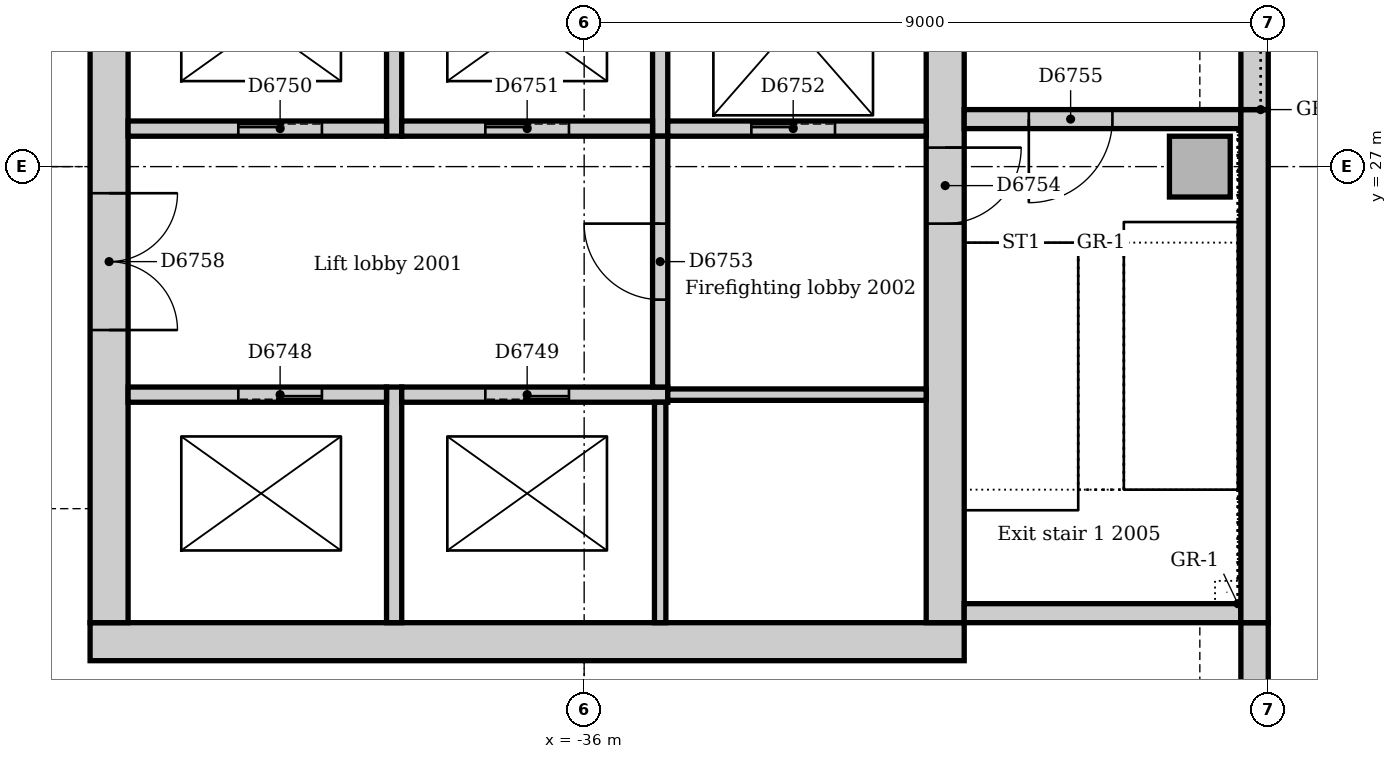
"""IFC4 building model, lengths in metres.
Left out: names, types, materials, properties, quantities, classifications, styles, units other than length and angle.
Written with IfcOpenShell. Run it as: python <this file> out.ifc"""

import sys

from ifc_helpers import new_model, si_unit, direction, frame, frame_2d, origin, origin_2d, place, context, subcontext, project, spatial, rectangle, extrude, element, fill, save


model = new_model("IFC4")
c1 = context("Model", 3, precision=1e-05, world=origin(), true_north=direction((0.0, 1.0)))
c2 = subcontext(c1, "Body", "Model", "MODEL_VIEW")
j1 = project(units=[si_unit("LENGTHUNIT", "METRE"), si_unit("PLANEANGLEUNIT", "RADIAN")], contexts=[c1])
p1 = place(None, origin())
s1 = spatial("IfcSite", under=j1, at=p1, CompositionType="ELEMENT")
p2 = place(p1, origin())
s2 = spatial("IfcBuilding", under=s1, at=p2, CompositionType="ELEMENT")
p3 = place(p2, frame((0.0, 0.0, 87.0)))
s3 = spatial("IfcBuildingStorey", under=s2, at=p3, CompositionType="ELEMENT", Elevation=87.0)
p4 = place(p3, frame((-42.5, 20.75, 0.0), z_axis=(0.0, 0.0, 1.0), x_axis=(1.0, 0.0, 0.0)))
e1 = element("IfcWall", 1, at=p4, inside=s3, PredefinedType="SOLIDWALL", context=c2, shape_type="SweptSolid", body=[
    extrude(rectangle(XDim=11.5, YDim=0.5, at=frame_2d((5.75, 0.0))), origin(), (0.0, 0.0, 1.0), 4.0),
])
p5 = place(p3, frame((-31.25, 21.0, 0.0), z_axis=(0.0, 0.0, 1.0), x_axis=(0.0, 1.0, 0.0)))
e2 = element("IfcWall", 2, at=p5, inside=s3, PredefinedType="SOLIDWALL", context=c2, shape_type="SweptSolid", body=[
    extrude(rectangle(XDim=9.5, YDim=0.5, at=frame_2d((4.75, 0.0))), origin(), (0.0, 0.0, 1.0), 4.0),
])
p6 = place(p5, frame((5.25, 0.0, 0.0)))
e3 = element("IfcOpeningElement", 3, at=p6, cuts=e2, PredefinedType="OPENING", context=c2, shape_type="SweptSolid", body=[
    extrude(rectangle(XDim=1.0, YDim=2.1, at=frame_2d((0.5, 1.05))), frame((0.0, 0.26, 0.0), z_axis=(0.0, -1.0, 0.0), x_axis=(1.0, 0.0, 0.0)), (0.0, 0.0, 1.0), 0.52),
])
p7 = place(p3, frame((-42.25, 30.5, 0.0), z_axis=(0.0, 0.0, 1.0), x_axis=(0.0, -1.0, 0.0)))
e4 = element("IfcWall", 4, at=p7, inside=s3, PredefinedType="SOLIDWALL", context=c2, shape_type="SweptSolid", body=[
    extrude(rectangle(XDim=9.5, YDim=0.5, at=frame_2d((4.75, 0.0))), origin(), (0.0, 0.0, 1.0), 4.0),
])
p8 = place(p7, frame((3.85, 0.0, 0.0)))
e5 = element("IfcOpeningElement", 5, at=p8, cuts=e4, PredefinedType="OPENING", context=c2, shape_type="SweptSolid", body=[
    extrude(rectangle(XDim=1.8, YDim=2.1, at=frame_2d((0.9, 1.05))), frame((0.0, 0.26, 0.0), z_axis=(0.0, -1.0, 0.0), x_axis=(1.0, 0.0, 0.0)), (0.0, 0.0, 1.0), 0.52),
])
p9 = place(p3, frame((-31.0, 21.125, 0.0), z_axis=(0.0, 0.0, 1.0), x_axis=(1.0, 0.0, 0.0)))
e6 = element("IfcWall", 6, at=p9, inside=s3, PredefinedType="SOLIDWALL", context=c2, shape_type="SweptSolid", body=[
    extrude(rectangle(XDim=3.64, YDim=0.25, at=frame_2d((1.82, 0.0))), origin(), (0.0, 0.0, 1.0), 4.0),
])
p10 = place(p3, frame((-27.36, 27.625, 0.0), z_axis=(0.0, 0.0, 1.0), x_axis=(-1.0, 0.0, 0.0)))
e7 = element("IfcWall", 7, at=p10, inside=s3, PredefinedType="SOLIDWALL", context=c2, shape_type="SweptSolid", body=[
    extrude(rectangle(XDim=3.64, YDim=0.25, at=frame_2d((1.82, 0.0))), origin(), (0.0, 0.0, 1.0), 4.0),
])
p11 = place(p10, frame((1.69, 0.0, 0.0)))
e8 = element("IfcOpeningElement", 8, at=p11, cuts=e7, PredefinedType="OPENING", context=c2, shape_type="SweptSolid", body=[
    extrude(rectangle(XDim=1.1, YDim=2.1, at=frame_2d((0.55, 1.05))), frame((0.0, 0.135, 0.0), z_axis=(0.0, -1.0, 0.0), x_axis=(1.0, 0.0, 0.0)), (0.0, 0.0, 1.0), 0.27),
])
p12 = place(p3, frame((-27.9, 27.0, 0.0), z_axis=(0.0, 0.0, 1.0), x_axis=(1.0, 0.0, 0.0)))
e9 = element("IfcColumn", 9, at=p12, inside=s3, PredefinedType="COLUMN", context=c2, shape_type="SweptSolid", body=[
    extrude(rectangle(XDim=0.8, YDim=0.8, at=origin_2d()), origin(), (0.0, 0.0, 1.0), 4.0),
])
p13 = place(p3, frame((-27.18, 13.243, 0.0), z_axis=(0.0, 0.0, 1.0), x_axis=(0.0, 1.0, 0.0)))
e10 = element("IfcWall", 10, at=p13, inside=s3, PredefinedType="STANDARD", context=c2, shape_type="SweptSolid", body=[
    extrude(rectangle(XDim=7.757, YDim=0.36, at=frame_2d((3.879, 0.0))), origin(), (0.0, 0.0, 1.0), 3.85),
])
p14 = place(p13, frame((1.982, 0.0, 0.9)))
e11 = element("IfcOpeningElement", 11, at=p14, cuts=e10, PredefinedType="OPENING", context=c2, shape_type="SweptSolid", body=[
    extrude(rectangle(XDim=3.3, YDim=1.6, at=frame_2d((1.65, 0.8))), frame((0.0, 0.19, 0.0), z_axis=(0.0, -1.0, 0.0), x_axis=(1.0, 0.0, 0.0)), (0.0, 0.0, 1.0), 0.38),
])
p15 = place(p3, frame((-27.18, 21.0, 0.0), z_axis=(0.0, 0.0, 1.0), x_axis=(0.0, 1.0, 0.0)))
e12 = element("IfcWall", 12, at=p15, inside=s3, PredefinedType="STANDARD", context=c2, shape_type="SweptSolid", body=[
    extrude(rectangle(XDim=6.75, YDim=0.36, at=frame_2d((3.375, 0.0))), origin(), (0.0, 0.0, 1.0), 3.85),
])
p16 = place(p3, frame((-27.18, 27.75, 0.0), z_axis=(0.0, 0.0, 1.0), x_axis=(0.0, 1.0, 0.0)))
e13 = element("IfcWall", 13, at=p16, inside=s3, PredefinedType="STANDARD", context=c2, shape_type="SweptSolid", body=[
    extrude(rectangle(XDim=7.5, YDim=0.36, at=frame_2d((3.75, 0.0))), origin(), (0.0, 0.0, 1.0), 3.85),
])
p17 = place(p16, frame((2.85, 0.0, 1.2)))
e14 = element("IfcOpeningElement", 14, at=p17, cuts=e13, PredefinedType="OPENING", context=c2, shape_type="SweptSolid", body=[
    extrude(rectangle(XDim=1.8, YDim=1.2, at=frame_2d((0.9, 0.6))), frame((0.0, 0.19, 0.0), z_axis=(0.0, -1.0, 0.0), x_axis=(1.0, 0.0, 0.0)), (0.0, 0.0, 1.0), 0.38),
])
p18 = place(p3, frame((-38.5, 21.0, 0.0), z_axis=(0.0, 0.0, 1.0), x_axis=(0.0, 1.0, 0.0)))
e15 = element("IfcWall", 15, at=p18, inside=s3, PredefinedType="SOLIDWALL", context=c2, shape_type="SweptSolid", body=[
    extrude(rectangle(XDim=3.1, YDim=0.2, at=frame_2d((1.55, 0.0))), origin(), (0.0, 0.0, 1.0), 4.0),
])
p19 = place(p3, frame((-38.6, 24.0, 0.0), z_axis=(0.0, 0.0, 1.0), x_axis=(-1.0, 0.0, 0.0)))
e16 = element("IfcWall", 16, at=p19, inside=s3, PredefinedType="SOLIDWALL", context=c2, shape_type="SweptSolid", body=[
    extrude(rectangle(XDim=3.4, YDim=0.2, at=frame_2d((1.7, 0.0))), origin(), (0.0, 0.0, 1.0), 4.0),
])
p20 = place(p19, frame((0.85, 0.0, 0.0)))
e17 = element("IfcOpeningElement", 17, at=p20, cuts=e16, PredefinedType="OPENING", context=c2, shape_type="SweptSolid", body=[
    extrude(rectangle(XDim=1.1, YDim=2.1, at=frame_2d((0.55, 1.05))), frame((0.0, 0.11, 0.0), z_axis=(0.0, -1.0, 0.0), x_axis=(1.0, 0.0, 0.0)), (0.0, 0.0, 1.0), 0.22),
])
p21 = place(p3, frame((-34.9, 24.0, 0.0), z_axis=(0.0, 0.0, 1.0), x_axis=(-1.0, 0.0, 0.0)))
e18 = element("IfcWall", 18, at=p21, inside=s3, PredefinedType="SOLIDWALL", context=c2, shape_type="SweptSolid", body=[
    extrude(rectangle(XDim=3.5, YDim=0.2, at=frame_2d((1.75, 0.0))), origin(), (0.0, 0.0, 1.0), 4.0),
])
p22 = place(p21, frame((1.3, 0.0, 0.0)))
e19 = element("IfcOpeningElement", 19, at=p22, cuts=e18, PredefinedType="OPENING", context=c2, shape_type="SweptSolid", body=[
    extrude(rectangle(XDim=1.1, YDim=2.1, at=frame_2d((0.55, 1.05))), frame((0.0, 0.11, 0.0), z_axis=(0.0, -1.0, 0.0), x_axis=(1.0, 0.0, 0.0)), (0.0, 0.0, 1.0), 0.22),
])
p23 = place(p3, frame((-38.5, 27.4, 0.0), z_axis=(0.0, 0.0, 1.0), x_axis=(0.0, 1.0, 0.0)))
e20 = element("IfcWall", 20, at=p23, inside=s3, PredefinedType="SOLIDWALL", context=c2, shape_type="SweptSolid", body=[
    extrude(rectangle(XDim=2.85, YDim=0.2, at=frame_2d((1.425, 0.0))), origin(), (0.0, 0.0, 1.0), 4.0),
])
p24 = place(p3, frame((-42.0, 27.5, 0.0), z_axis=(0.0, 0.0, 1.0), x_axis=(1.0, 0.0, 0.0)))
e21 = element("IfcWall", 21, at=p24, inside=s3, PredefinedType="SOLIDWALL", context=c2, shape_type="SweptSolid", body=[
    extrude(rectangle(XDim=3.4, YDim=0.2, at=frame_2d((1.7, 0.0))), origin(), (0.0, 0.0, 1.0), 4.0),
])
p25 = place(p24, frame((1.45, 0.0, 0.0)))
e22 = element("IfcOpeningElement", 22, at=p25, cuts=e21, PredefinedType="OPENING", context=c2, shape_type="SweptSolid", body=[
    extrude(rectangle(XDim=1.1, YDim=2.1, at=frame_2d((0.55, 1.05))), frame((0.0, 0.11, 0.0), z_axis=(0.0, -1.0, 0.0), x_axis=(1.0, 0.0, 0.0)), (0.0, 0.0, 1.0), 0.22),
])
p26 = place(p3, frame((-35.0, 27.4, 0.0), z_axis=(0.0, 0.0, 1.0), x_axis=(0.0, 1.0, 0.0)))
e23 = element("IfcWall", 23, at=p26, inside=s3, PredefinedType="SOLIDWALL", context=c2, shape_type="SweptSolid", body=[
    extrude(rectangle(XDim=2.85, YDim=0.2, at=frame_2d((1.425, 0.0))), origin(), (0.0, 0.0, 1.0), 4.0),
])
p27 = place(p3, frame((-38.4, 27.5, 0.0), z_axis=(0.0, 0.0, 1.0), x_axis=(1.0, 0.0, 0.0)))
e24 = element("IfcWall", 24, at=p27, inside=s3, PredefinedType="SOLIDWALL", context=c2, shape_type="SweptSolid", body=[
    extrude(rectangle(XDim=3.3, YDim=0.2, at=frame_2d((1.65, 0.0))), origin(), (0.0, 0.0, 1.0), 4.0),
])
p28 = place(p27, frame((1.1, 0.0, 0.0)))
e25 = element("IfcOpeningElement", 25, at=p28, cuts=e24, PredefinedType="OPENING", context=c2, shape_type="SweptSolid", body=[
    extrude(rectangle(XDim=1.1, YDim=2.1, at=frame_2d((0.55, 1.05))), frame((0.0, 0.11, 0.0), z_axis=(0.0, -1.0, 0.0), x_axis=(1.0, 0.0, 0.0)), (0.0, 0.0, 1.0), 0.22),
])
p29 = place(p3, frame((-34.9, 27.5, 0.0), z_axis=(0.0, 0.0, 1.0), x_axis=(1.0, 0.0, 0.0)))
e26 = element("IfcWall", 26, at=p29, inside=s3, PredefinedType="SOLIDWALL", context=c2, shape_type="SweptSolid", body=[
    extrude(rectangle(XDim=3.4, YDim=0.2, at=frame_2d((1.7, 0.0))), origin(), (0.0, 0.0, 1.0), 4.0),
])
p30 = place(p29, frame((1.1, 0.0, 0.0)))
e27 = element("IfcOpeningElement", 27, at=p30, cuts=e26, PredefinedType="OPENING", context=c2, shape_type="SweptSolid", body=[
    extrude(rectangle(XDim=1.1, YDim=2.1, at=frame_2d((0.55, 1.05))), frame((0.0, 0.11, 0.0), z_axis=(0.0, -1.0, 0.0), x_axis=(1.0, 0.0, 0.0)), (0.0, 0.0, 1.0), 0.22),
])
p31 = place(p3, frame((-35.0, 24.1, 0.0), z_axis=(0.0, 0.0, 1.0), x_axis=(0.0, 1.0, 0.0)))
e28 = element("IfcWall", 28, at=p31, inside=s3, PredefinedType="SOLIDWALL", context=c2, shape_type="SweptSolid", body=[
    extrude(rectangle(XDim=3.3, YDim=0.2, at=frame_2d((1.65, 0.0))), origin(), (0.0, 0.0, 1.0), 4.0),
])
p32 = place(p31, frame((1.15, 0.0, 0.0)))
e29 = element("IfcOpeningElement", 29, at=p32, cuts=e28, PredefinedType="OPENING", context=c2, shape_type="SweptSolid", body=[
    extrude(rectangle(XDim=1.0, YDim=2.1, at=frame_2d((0.5, 1.05))), frame((0.0, 0.11, 0.0), z_axis=(0.0, -1.0, 0.0), x_axis=(1.0, 0.0, 0.0)), (0.0, 0.0, 1.0), 0.22),
])
p33 = place(p3, frame((-35.0, 21.0, 0.0), z_axis=(0.0, 0.0, 1.0), x_axis=(0.0, 1.0, 0.0)))
e30 = element("IfcWall", 30, at=p33, inside=s3, PredefinedType="SOLIDWALL", context=c2, shape_type="SweptSolid", body=[
    extrude(rectangle(XDim=2.9, YDim=0.15, at=frame_2d((1.45, 0.0))), origin(), (0.0, 0.0, 1.0), 4.0),
])
p34 = place(p3, frame((-31.5, 24.0, 0.0), z_axis=(0.0, 0.0, 1.0), x_axis=(-1.0, 0.0, 0.0)))
e31 = element("IfcWall", 31, at=p34, inside=s3, PredefinedType="SOLIDWALL", context=c2, shape_type="SweptSolid", body=[
    extrude(rectangle(XDim=3.4, YDim=0.15, at=frame_2d((1.7, 0.0))), origin(), (0.0, 0.0, 1.0), 4.0),
])
p35 = place(p20, origin())
e32 = element("IfcDoor", 32, at=p35, inside=s3, OperationType="SLIDING_TO_LEFT", PredefinedType="DOOR", context=c2, shape_type="SweptSolid", body=[
    extrude(rectangle(XDim=1.1, YDim=2.1, at=frame_2d((0.55, 1.05))), frame((0.0, 0.025, 0.0), z_axis=(0.0, -1.0, 0.0), x_axis=(1.0, 0.0, 0.0)), (0.0, 0.0, 1.0), 0.05),
])
fill(e17, e32)
p36 = place(p22, origin())
e33 = element("IfcDoor", 33, at=p36, inside=s3, OperationType="SLIDING_TO_LEFT", PredefinedType="DOOR", context=c2, shape_type="SweptSolid", body=[
    extrude(rectangle(XDim=1.1, YDim=2.1, at=frame_2d((0.55, 1.05))), frame((0.0, 0.025, 0.0), z_axis=(0.0, -1.0, 0.0), x_axis=(1.0, 0.0, 0.0)), (0.0, 0.0, 1.0), 0.05),
])
fill(e19, e33)
p37 = place(p25, origin())
e34 = element("IfcDoor", 34, at=p37, inside=s3, OperationType="SLIDING_TO_LEFT", PredefinedType="DOOR", context=c2, shape_type="SweptSolid", body=[
    extrude(rectangle(XDim=1.1, YDim=2.1, at=frame_2d((0.55, 1.05))), frame((0.0, 0.025, 0.0), z_axis=(0.0, -1.0, 0.0), x_axis=(1.0, 0.0, 0.0)), (0.0, 0.0, 1.0), 0.05),
])
fill(e22, e34)
p38 = place(p28, origin())
e35 = element("IfcDoor", 35, at=p38, inside=s3, OperationType="SLIDING_TO_LEFT", PredefinedType="DOOR", context=c2, shape_type="SweptSolid", body=[
    extrude(rectangle(XDim=1.1, YDim=2.1, at=frame_2d((0.55, 1.05))), frame((0.0, 0.025, 0.0), z_axis=(0.0, -1.0, 0.0), x_axis=(1.0, 0.0, 0.0)), (0.0, 0.0, 1.0), 0.05),
])
fill(e25, e35)
p39 = place(p30, origin())
e36 = element("IfcDoor", 36, at=p39, inside=s3, OperationType="SLIDING_TO_LEFT", PredefinedType="DOOR", context=c2, shape_type="SweptSolid", body=[
    extrude(rectangle(XDim=1.1, YDim=2.1, at=frame_2d((0.55, 1.05))), frame((0.0, 0.025, 0.0), z_axis=(0.0, -1.0, 0.0), x_axis=(1.0, 0.0, 0.0)), (0.0, 0.0, 1.0), 0.05),
])
fill(e27, e36)
p40 = place(p32, origin())
e37 = element("IfcDoor", 37, at=p40, inside=s3, OperationType="SINGLE_SWING_RIGHT", PredefinedType="DOOR", context=c2, shape_type="SweptSolid", body=[
    extrude(rectangle(XDim=1.0, YDim=2.1, at=frame_2d((0.5, 1.05))), frame((0.0, 0.025, 0.0), z_axis=(0.0, -1.0, 0.0), x_axis=(1.0, 0.0, 0.0)), (0.0, 0.0, 1.0), 0.05),
])
fill(e29, e37)
p41 = place(p6, frame((1.0, 0.0, 0.0), z_axis=(0.0, 0.0, 1.0), x_axis=(-1.0, 0.0, 0.0)))
e38 = element("IfcDoor", 38, at=p41, inside=s3, OperationType="SINGLE_SWING_LEFT", PredefinedType="DOOR", context=c2, shape_type="SweptSolid", body=[
    extrude(rectangle(XDim=1.0, YDim=2.1, at=frame_2d((0.5, 1.05))), frame((0.0, 0.025, 0.0), z_axis=(0.0, -1.0, 0.0), x_axis=(1.0, 0.0, 0.0)), (0.0, 0.0, 1.0), 0.05),
])
fill(e3, e38)
p42 = place(p11, origin())
e39 = element("IfcDoor", 39, at=p42, inside=s3, OperationType="SINGLE_SWING_RIGHT", PredefinedType="DOOR", context=c2, shape_type="SweptSolid", body=[
    extrude(rectangle(XDim=1.1, YDim=2.1, at=frame_2d((0.55, 1.05))), frame((0.0, 0.025, 0.0), z_axis=(0.0, -1.0, 0.0), x_axis=(1.0, 0.0, 0.0)), (0.0, 0.0, 1.0), 0.05),
])
fill(e8, e39)
p43 = place(p8, origin())
e40 = element("IfcDoor", 40, at=p43, inside=s3, OperationType="DOUBLE_DOOR_SINGLE_SWING", PredefinedType="DOOR", context=c2, shape_type="SweptSolid", body=[
    extrude(rectangle(XDim=1.8, YDim=2.1, at=frame_2d((0.9, 1.05))), frame((0.0, 0.025, 0.0), z_axis=(0.0, -1.0, 0.0), x_axis=(1.0, 0.0, 0.0)), (0.0, 0.0, 1.0), 0.05),
])
fill(e5, e40)
save(model, sys.argv[1])
